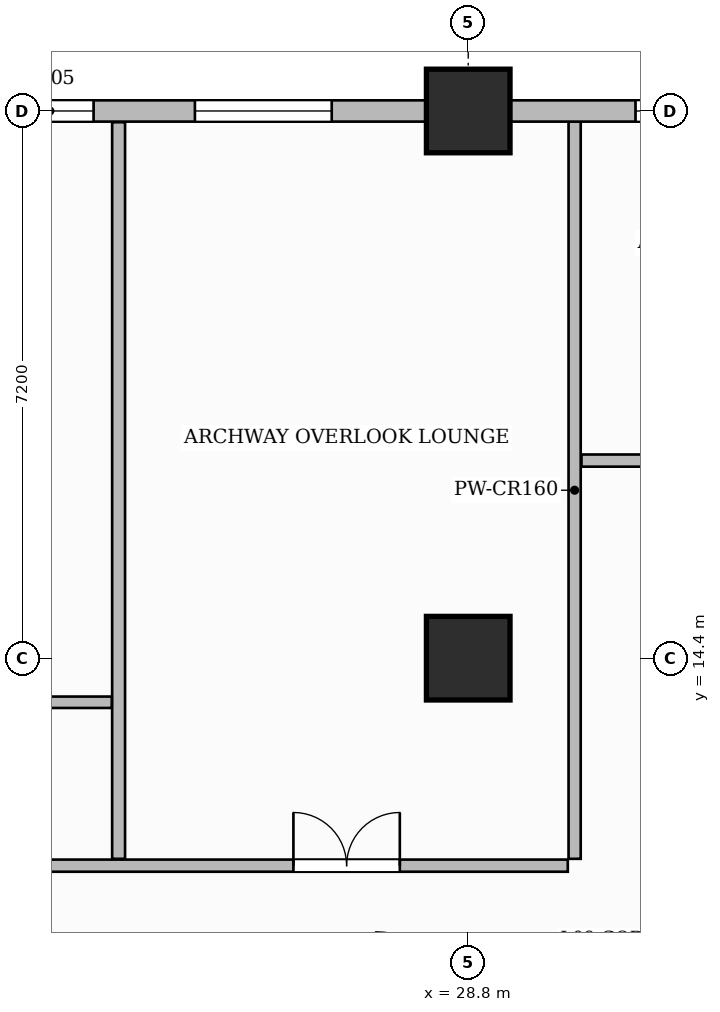
"""IFC4 building model, lengths in metres.
Left out: names, types, materials, properties, quantities, classifications, styles, units other than length and angle.
Written with IfcOpenShell. Run it as: python <this file> out.ifc"""

import sys

from ifc_helpers import new_model, si_unit, direction, frame, frame_2d, origin, origin_2d, place, context, subcontext, project, spatial, rectangle, extrude, source, transform, mapped, element, fill, save


model = new_model("IFC4")
c1 = context("Model", 3, precision=1e-05, world=origin(), true_north=direction((0.0, 1.0)))
c2 = subcontext(c1, "Body", "Model", "MODEL_VIEW")
j1 = project(units=[si_unit("LENGTHUNIT", "METRE"), si_unit("PLANEANGLEUNIT", "RADIAN")], contexts=[c1])
p1 = place(None, origin())
s1 = spatial("IfcSite", under=j1, at=p1, CompositionType="ELEMENT")
p2 = place(p1, origin())
s2 = spatial("IfcBuilding", under=s1, at=p2, CompositionType="ELEMENT")
p3 = place(p2, frame((0.0, 0.0, 43.5)))
s3 = spatial("IfcBuildingStorey", under=s2, at=p3, CompositionType="ELEMENT", Elevation=43.5)
m1 = source(origin(), c2, "Body", "SweptSolid", [
    extrude(rectangle(XDim=1.1, YDim=1.1, at=origin_2d()), origin(), (0.0, 0.0, 1.0), 3.7),
])
for number, where, z_axis, x_axis in (
    (1, (28.8, 14.4, 0.0), (0.0, 0.0, 1.0), (1.0, 0.0, 0.0)),
    (2, (28.8, 21.6, 0.0), (0.0, 0.0, 1.0), (1.0, 0.0, 0.0)),
):
    element("IfcColumn", number, at=place(p3, frame(where, z_axis=z_axis, x_axis=x_axis)), inside=s3, PredefinedType="COLUMN", context=c2, shape_type="MappedRepresentation", body=[
        mapped(m1, transform((0.0, 0.0, 0.0), scale=1.0)),
    ])
p4 = place(p3, frame((14.548, 11.67, 0.0), z_axis=(0.0, 0.0, 1.0), x_axis=(1.0, 0.0, 0.0)))
e3 = element("IfcWall", 3, at=p4, inside=s3, PredefinedType="PARTITIONING", context=c2, shape_type="SweptSolid", body=[
    extrude(rectangle(XDim=15.562, YDim=0.16, at=frame_2d((7.781, 0.0))), origin(), (0.0, 0.0, 1.0), 3.45),
])
p5 = place(p4, frame((3.082, 0.0, 0.0)))
e4 = element("IfcOpeningElement", 4, at=p5, cuts=e3, PredefinedType="OPENING", context=c2, shape_type="SweptSolid", body=[
    extrude(rectangle(XDim=1.05, YDim=2.25, at=frame_2d((0.525, 1.125))), frame((0.0, 0.09, 0.0), z_axis=(0.0, -1.0, 0.0), x_axis=(1.0, 0.0, 0.0)), (0.0, 0.0, 1.0), 0.18),
])
p6 = place(p4, frame((11.952, 0.0, 0.0)))
e5 = element("IfcOpeningElement", 5, at=p6, cuts=e3, PredefinedType="OPENING", context=c2, shape_type="SweptSolid", body=[
    extrude(rectangle(XDim=1.4, YDim=2.35, at=frame_2d((0.7, 1.175))), frame((0.0, 0.09, 0.0), z_axis=(0.0, -1.0, 0.0), x_axis=(1.0, 0.0, 0.0)), (0.0, 0.0, 1.0), 0.18),
])
p7 = place(p3, frame((30.2, 11.76, 0.0), z_axis=(0.0, 0.0, 1.0), x_axis=(0.0, 1.0, 0.0)))
e6 = element("IfcWall", 6, at=p7, inside=s3, PredefinedType="PARTITIONING", context=c2, shape_type="SweptSolid", body=[
    extrude(rectangle(XDim=9.7, YDim=0.16, at=frame_2d((4.85, 0.0))), origin(), (0.0, 0.0, 1.0), 3.45),
])
p8 = place(p3, frame((30.29, 17.0, 0.0), z_axis=(0.0, 0.0, 1.0), x_axis=(1.0, 0.0, 0.0)))
e7 = element("IfcWall", 7, at=p8, inside=s3, PredefinedType="PARTITIONING", context=c2, shape_type="SweptSolid", body=[
    extrude(rectangle(XDim=19.37, YDim=0.16, at=frame_2d((9.685, 0.0))), origin(), (0.0, 0.0, 1.0), 3.45),
])
p9 = place(p8, frame((1.185, 0.0, 0.0)))
e8 = element("IfcOpeningElement", 8, at=p9, cuts=e7, PredefinedType="OPENING", context=c2, shape_type="SweptSolid", body=[
    extrude(rectangle(XDim=0.85, YDim=2.1, at=frame_2d((0.425, 1.05))), frame((0.0, 0.09, 0.0), z_axis=(0.0, -1.0, 0.0), x_axis=(1.0, 0.0, 0.0)), (0.0, 0.0, 1.0), 0.18),
])
p10 = place(p8, frame((6.66, 0.0, 0.0)))
e9 = element("IfcOpeningElement", 9, at=p10, cuts=e7, PredefinedType="OPENING", context=c2, shape_type="SweptSolid", body=[
    extrude(rectangle(XDim=0.9, YDim=2.15, at=frame_2d((0.45, 1.075))), frame((0.0, 0.09, 0.0), z_axis=(0.0, -1.0, 0.0), x_axis=(1.0, 0.0, 0.0)), (0.0, 0.0, 1.0), 0.18),
])
p11 = place(p8, frame((14.46, 0.0, 0.0)))
e10 = element("IfcOpeningElement", 10, at=p11, cuts=e7, PredefinedType="OPENING", context=c2, shape_type="SweptSolid", body=[
    extrude(rectangle(XDim=1.4, YDim=2.35, at=frame_2d((0.7, 1.175))), frame((0.0, 0.09, 0.0), z_axis=(0.0, -1.0, 0.0), x_axis=(1.0, 0.0, 0.0)), (0.0, 0.0, 1.0), 0.18),
])
p12 = place(p3, frame((24.2, 11.76, 0.0), z_axis=(0.0, 0.0, 1.0), x_axis=(0.0, 1.0, 0.0)))
e11 = element("IfcWall", 11, at=p12, inside=s3, PredefinedType="PARTITIONING", context=c2, shape_type="SweptSolid", body=[
    extrude(rectangle(XDim=9.692, YDim=0.17, at=frame_2d((4.846, 0.0))), origin(), (0.0, 0.0, 1.0), 3.45),
])
p13 = place(p3, frame((19.57, 13.82, 0.0), z_axis=(0.0, 0.0, 1.0), x_axis=(1.0, 0.0, 0.0)))
e12 = element("IfcWall", 12, at=p13, inside=s3, PredefinedType="PARTITIONING", context=c2, shape_type="SweptSolid", body=[
    extrude(rectangle(XDim=4.54, YDim=0.15, at=frame_2d((2.27, 0.0))), origin(), (0.0, 0.0, 1.0), 3.45),
])
p14 = place(p13, frame((2.788, 0.0, 0.0)))
e13 = element("IfcOpeningElement", 13, at=p14, cuts=e12, PredefinedType="OPENING", context=c2, shape_type="SweptSolid", body=[
    extrude(rectangle(XDim=0.9, YDim=2.15, at=frame_2d((0.45, 1.075))), frame((0.0, 0.085, 0.0), z_axis=(0.0, -1.0, 0.0), x_axis=(1.0, 0.0, 0.0)), (0.0, 0.0, 1.0), 0.17),
])
p15 = place(p3, frame((14.4, 21.6, 0.0), z_axis=(0.0, 0.0, 1.0), x_axis=(1.0, 0.0, 0.0)))
e14 = element("IfcWall", 14, at=p15, inside=s3, PredefinedType="SOLIDWALL", context=c2, shape_type="SweptSolid", body=[
    extrude(rectangle(XDim=43.2, YDim=0.28, at=frame_2d((21.6, 0.0))), origin(), (0.0, 0.0, 1.0), 2.885),
])
p16 = place(p15, frame((1.5, 0.0, 0.0)))
e15 = element("IfcOpeningElement", 15, at=p16, cuts=e14, PredefinedType="OPENING", context=c2, shape_type="SweptSolid", body=[
    extrude(rectangle(XDim=1.2, YDim=2.2, at=frame_2d((0.6, 1.1))), frame((0.0, 0.15, 0.0), z_axis=(0.0, -1.0, 0.0), x_axis=(1.0, 0.0, 0.0)), (0.0, 0.0, 1.0), 0.3),
])
p17 = place(p15, frame((3.336, 0.0, 0.8)))
e16 = element("IfcOpeningElement", 16, at=p17, cuts=e14, PredefinedType="OPENING", context=c2, shape_type="SweptSolid", body=[
    extrude(rectangle(XDim=1.4, YDim=1.85, at=frame_2d((0.7, 0.925))), frame((0.0, 0.15, 0.0), z_axis=(0.0, -1.0, 0.0), x_axis=(1.0, 0.0, 0.0)), (0.0, 0.0, 1.0), 0.3),
])
p18 = place(p15, frame((5.269, 0.0, 0.8)))
e17 = element("IfcOpeningElement", 17, at=p18, cuts=e14, PredefinedType="OPENING", context=c2, shape_type="SweptSolid", body=[
    extrude(rectangle(XDim=0.95, YDim=1.75, at=frame_2d((0.475, 0.875))), frame((0.0, 0.15, 0.0), z_axis=(0.0, -1.0, 0.0), x_axis=(1.0, 0.0, 0.0)), (0.0, 0.0, 1.0), 0.3),
])
p19 = place(p15, frame((8.321, 0.0, 0.8)))
e18 = element("IfcOpeningElement", 18, at=p19, cuts=e14, PredefinedType="OPENING", context=c2, shape_type="SweptSolid", body=[
    extrude(rectangle(XDim=1.15, YDim=1.8, at=frame_2d((0.575, 0.9))), frame((0.0, 0.15, 0.0), z_axis=(0.0, -1.0, 0.0), x_axis=(1.0, 0.0, 0.0)), (0.0, 0.0, 1.0), 0.3),
])
p20 = place(p15, frame((10.804, 0.0, 0.8)))
e19 = element("IfcOpeningElement", 19, at=p20, cuts=e14, PredefinedType="OPENING", context=c2, shape_type="SweptSolid", body=[
    extrude(rectangle(XDim=1.8, YDim=1.85, at=frame_2d((0.9, 0.925))), frame((0.0, 0.15, 0.0), z_axis=(0.0, -1.0, 0.0), x_axis=(1.0, 0.0, 0.0)), (0.0, 0.0, 1.0), 0.3),
])
p21 = place(p15, frame((16.601, 0.0, 0.8)))
e20 = element("IfcOpeningElement", 20, at=p21, cuts=e14, PredefinedType="OPENING", context=c2, shape_type="SweptSolid", body=[
    extrude(rectangle(XDim=1.8, YDim=1.85, at=frame_2d((0.9, 0.925))), frame((0.0, 0.15, 0.0), z_axis=(0.0, -1.0, 0.0), x_axis=(1.0, 0.0, 0.0)), (0.0, 0.0, 1.0), 0.3),
])
p22 = place(p15, frame((21.723, 0.0, 0.8)))
e21 = element("IfcOpeningElement", 21, at=p22, cuts=e14, PredefinedType="OPENING", context=c2, shape_type="SweptSolid", body=[
    extrude(rectangle(XDim=1.8, YDim=1.85, at=frame_2d((0.9, 0.925))), frame((0.0, 0.15, 0.0), z_axis=(0.0, -1.0, 0.0), x_axis=(1.0, 0.0, 0.0)), (0.0, 0.0, 1.0), 0.3),
])
p23 = place(p15, frame((24.469, 0.0, 0.8)))
e22 = element("IfcOpeningElement", 22, at=p23, cuts=e14, PredefinedType="OPENING", context=c2, shape_type="SweptSolid", body=[
    extrude(rectangle(XDim=1.8, YDim=1.85, at=frame_2d((0.9, 0.925))), frame((0.0, 0.15, 0.0), z_axis=(0.0, -1.0, 0.0), x_axis=(1.0, 0.0, 0.0)), (0.0, 0.0, 1.0), 0.3),
])
p24 = place(p15, frame((29.075, 0.0, 0.8)))
e23 = element("IfcOpeningElement", 23, at=p24, cuts=e14, PredefinedType="OPENING", context=c2, shape_type="SweptSolid", body=[
    extrude(rectangle(XDim=1.8, YDim=1.85, at=frame_2d((0.9, 0.925))), frame((0.0, 0.15, 0.0), z_axis=(0.0, -1.0, 0.0), x_axis=(1.0, 0.0, 0.0)), (0.0, 0.0, 1.0), 0.3),
])
p25 = place(p15, frame((32.125, 0.0, 0.8)))
e24 = element("IfcOpeningElement", 24, at=p25, cuts=e14, PredefinedType="OPENING", context=c2, shape_type="SweptSolid", body=[
    extrude(rectangle(XDim=1.8, YDim=1.85, at=frame_2d((0.9, 0.925))), frame((0.0, 0.15, 0.0), z_axis=(0.0, -1.0, 0.0), x_axis=(1.0, 0.0, 0.0)), (0.0, 0.0, 1.0), 0.3),
])
p26 = place(p15, frame((36.875, 0.0, 0.8)))
e25 = element("IfcOpeningElement", 25, at=p26, cuts=e14, PredefinedType="OPENING", context=c2, shape_type="SweptSolid", body=[
    extrude(rectangle(XDim=1.8, YDim=1.85, at=frame_2d((0.9, 0.925))), frame((0.0, 0.15, 0.0), z_axis=(0.0, -1.0, 0.0), x_axis=(1.0, 0.0, 0.0)), (0.0, 0.0, 1.0), 0.3),
])
p27 = place(p15, frame((39.925, 0.0, 0.8)))
e26 = element("IfcOpeningElement", 26, at=p27, cuts=e14, PredefinedType="OPENING", context=c2, shape_type="SweptSolid", body=[
    extrude(rectangle(XDim=1.8, YDim=1.85, at=frame_2d((0.9, 0.925))), frame((0.0, 0.15, 0.0), z_axis=(0.0, -1.0, 0.0), x_axis=(1.0, 0.0, 0.0)), (0.0, 0.0, 1.0), 0.3),
])
m2 = source(origin(), c2, "Body", "SweptSolid", [
    extrude(rectangle(XDim=1.4, YDim=2.35, at=frame_2d((0.7, 1.175))), frame((0.0, 0.025, 0.0), z_axis=(0.0, -1.0, 0.0), x_axis=(1.0, 0.0, 0.0)), (0.0, 0.0, 1.0), 0.05),
])
p28 = place(p6, origin())
e27 = element("IfcDoor", 27, at=p28, inside=s3, OperationType="DOUBLE_DOOR_SINGLE_SWING", PredefinedType="DOOR", context=c2, shape_type="MappedRepresentation", body=[
    mapped(m2, transform((0.0, 0.0, 0.0), scale=1.0)),
])
fill(e5, e27)
m3 = source(origin(), c2, "Body", "SweptSolid", [
    extrude(rectangle(XDim=1.15, YDim=1.8, at=frame_2d((0.575, 0.9))), frame((0.0, 0.03, 0.0), z_axis=(0.0, -1.0, 0.0), x_axis=(1.0, 0.0, 0.0)), (0.0, 0.0, 1.0), 0.06),
])
p29 = place(p19, origin())
e28 = element("IfcWindow", 28, at=p29, inside=s3, PartitioningType="SINGLE_PANEL", PredefinedType="WINDOW", context=c2, shape_type="MappedRepresentation", body=[
    mapped(m3, transform((0.0, 0.0, 0.0), scale=1.0)),
])
fill(e18, e28)
m4 = source(origin(), c2, "Body", "SweptSolid", [
    extrude(rectangle(XDim=1.8, YDim=1.85, at=frame_2d((0.9, 0.925))), frame((0.0, 0.03, 0.0), z_axis=(0.0, -1.0, 0.0), x_axis=(1.0, 0.0, 0.0)), (0.0, 0.0, 1.0), 0.06),
])
p30 = place(p20, origin())
e29 = element("IfcWindow", 29, at=p30, inside=s3, PartitioningType="DOUBLE_PANEL_VERTICAL", PredefinedType="WINDOW", context=c2, shape_type="MappedRepresentation", body=[
    mapped(m4, transform((0.0, 0.0, 0.0), scale=1.0)),
])
fill(e19, e29)
p31 = place(p21, origin())
e30 = element("IfcWindow", 30, at=p31, inside=s3, PartitioningType="DOUBLE_PANEL_VERTICAL", PredefinedType="WINDOW", context=c2, shape_type="MappedRepresentation", body=[
    mapped(m4, transform((0.0, 0.0, 0.0), scale=1.0)),
])
fill(e20, e30)
save(model, sys.argv[1])
